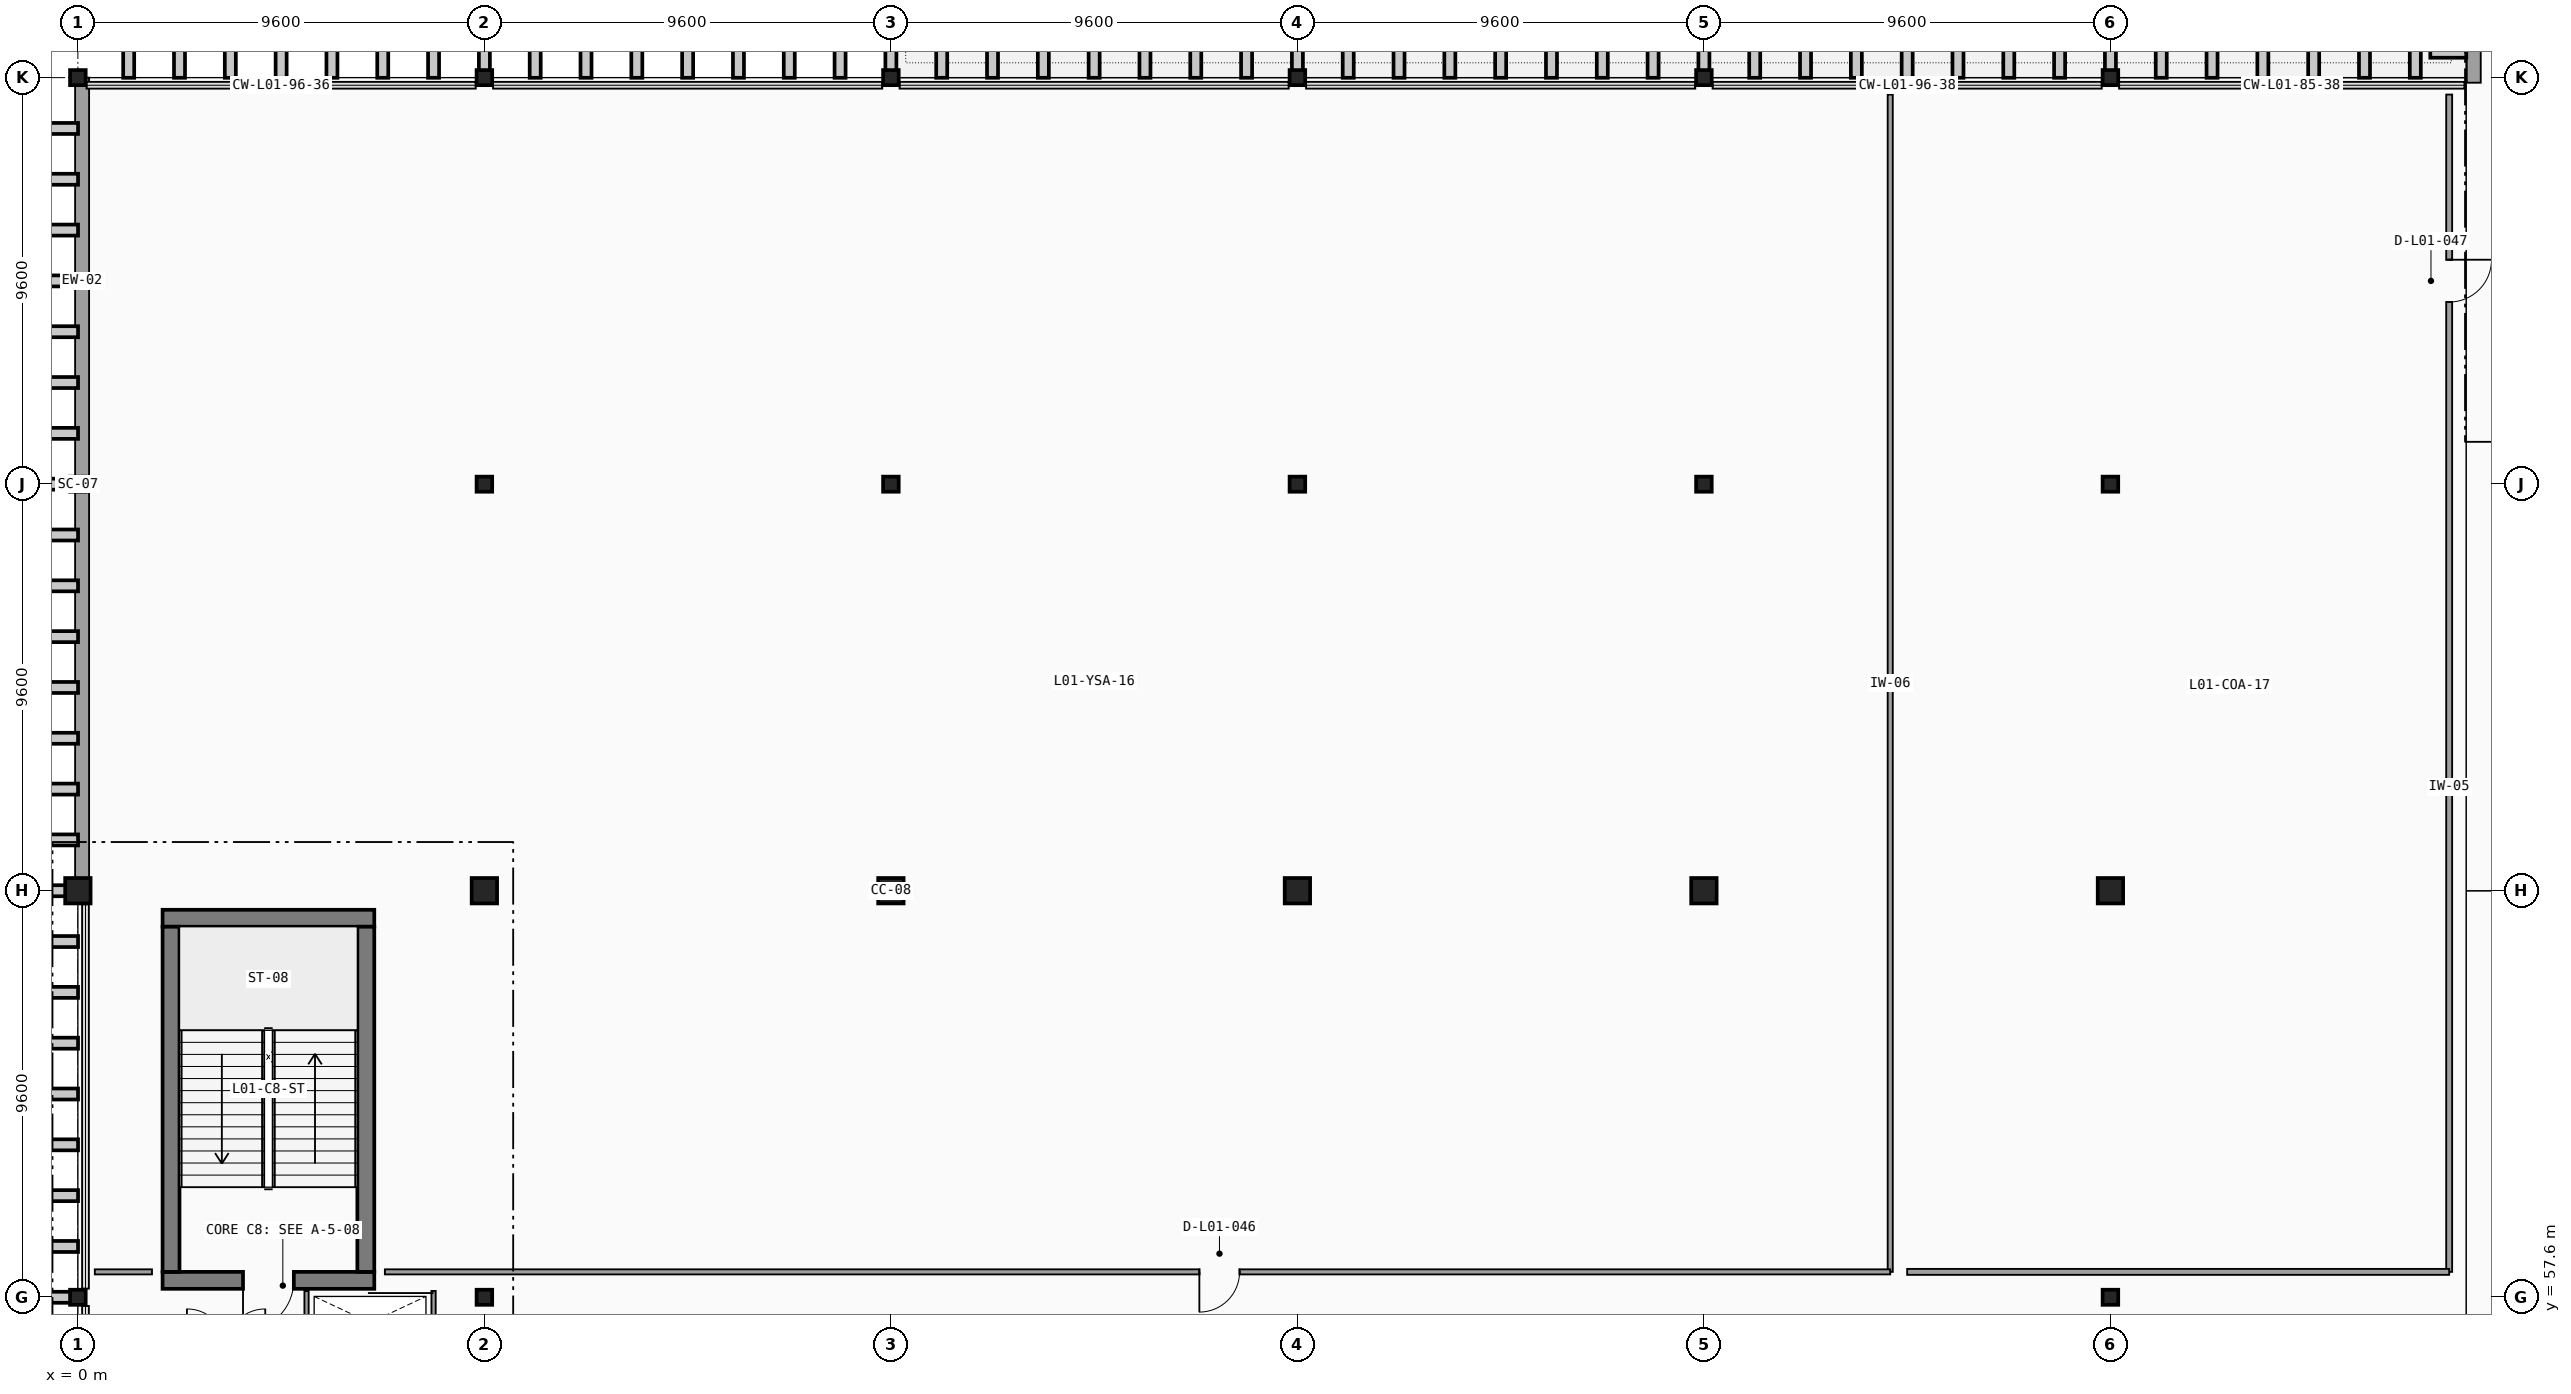
"""IFC4 building model, lengths in metres.
Left out: names, types, materials, properties, quantities, classifications, styles, units other than length and angle.
Written with IfcOpenShell. Run it as: python <this file> out.ifc"""

import sys

from ifc_helpers import new_model, si_unit, direction, frame, frame_2d, origin, origin_2d, place, context, subcontext, project, spatial, rectangle, i_section, extrude, element, fill, save


model = new_model("IFC4")
c1 = context("Model", 3, precision=1e-05, world=origin(), true_north=direction((0.0, 1.0)))
c2 = subcontext(c1, "Body", "Model", "MODEL_VIEW")
j1 = project(units=[si_unit("LENGTHUNIT", "METRE"), si_unit("PLANEANGLEUNIT", "RADIAN")], contexts=[c1])
p1 = place(None, origin())
s1 = spatial("IfcSite", under=j1, at=p1, CompositionType="ELEMENT")
p2 = place(p1, origin())
s2 = spatial("IfcBuilding", under=s1, at=p2, CompositionType="ELEMENT")
p3 = place(p2, frame((0.0, 0.0, 4.8)))
s3 = spatial("IfcBuildingStorey", under=s2, at=p3, CompositionType="ELEMENT", Elevation=4.8)
p4 = place(p3, frame((0.0, 57.6, 0.0), z_axis=(0.0, 0.0, 1.0), x_axis=(1.0, 0.0, 0.0)))
e1 = element("IfcColumn", 1, at=p4, inside=s3, PredefinedType="COLUMN", context=c2, shape_type="SweptSolid", body=[
    extrude(i_section(OverallWidth=0.369, OverallDepth=0.356, WebThickness=0.011, FlangeThickness=0.018, FilletRadius=0.015, at=origin_2d()), origin(), (0.0, 0.0, 1.0), 4.8),
])
p5 = place(p3, frame((0.0, 67.2, 0.0), z_axis=(0.0, 0.0, 1.0), x_axis=(1.0, 0.0, 0.0)))
e2 = element("IfcColumn", 2, at=p5, inside=s3, PredefinedType="COLUMN", context=c2, shape_type="SweptSolid", body=[
    extrude(rectangle(XDim=0.6, YDim=0.6, at=origin_2d()), origin(), (0.0, 0.0, 1.0), 4.8),
])
for number, where, z_axis, x_axis in (
    (3, (0.0, 76.8, 0.0), (0.0, 0.0, 1.0), (1.0, 0.0, 0.0)),
    (4, (0.0, 86.4, 0.0), (0.0, 0.0, 1.0), (1.0, 0.0, 0.0)),
    (5, (9.6, 57.6, 0.0), (0.0, 0.0, 1.0), (1.0, 0.0, 0.0)),
):
    element("IfcColumn", number, at=place(p3, frame(where, z_axis=z_axis, x_axis=x_axis)), inside=s3, PredefinedType="COLUMN", context=c2, shape_type="SweptSolid", body=[
        extrude(i_section(OverallWidth=0.369, OverallDepth=0.356, WebThickness=0.011, FlangeThickness=0.018, FilletRadius=0.015, at=origin_2d()), origin(), (0.0, 0.0, 1.0), 4.8),
    ])
p6 = place(p3, frame((9.6, 67.2, 0.0), z_axis=(0.0, 0.0, 1.0), x_axis=(1.0, 0.0, 0.0)))
e6 = element("IfcColumn", 6, at=p6, inside=s3, PredefinedType="COLUMN", context=c2, shape_type="SweptSolid", body=[
    extrude(rectangle(XDim=0.6, YDim=0.6, at=origin_2d()), origin(), (0.0, 0.0, 1.0), 4.8),
])
for number, where, z_axis, x_axis in (
    (7, (9.6, 76.8, 0.0), (0.0, 0.0, 1.0), (1.0, 0.0, 0.0)),
    (8, (9.6, 86.4, 0.0), (0.0, 0.0, 1.0), (1.0, 0.0, 0.0)),
):
    element("IfcColumn", number, at=place(p3, frame(where, z_axis=z_axis, x_axis=x_axis)), inside=s3, PredefinedType="COLUMN", context=c2, shape_type="SweptSolid", body=[
        extrude(i_section(OverallWidth=0.369, OverallDepth=0.356, WebThickness=0.011, FlangeThickness=0.018, FilletRadius=0.015, at=origin_2d()), origin(), (0.0, 0.0, 1.0), 4.8),
    ])
p7 = place(p3, frame((19.2, 67.2, 0.0), z_axis=(0.0, 0.0, 1.0), x_axis=(1.0, 0.0, 0.0)))
e9 = element("IfcColumn", 9, at=p7, inside=s3, PredefinedType="COLUMN", context=c2, shape_type="SweptSolid", body=[
    extrude(rectangle(XDim=0.6, YDim=0.6, at=origin_2d()), origin(), (0.0, 0.0, 1.0), 4.8),
])
for number, where, z_axis, x_axis in (
    (10, (19.2, 76.8, 0.0), (0.0, 0.0, 1.0), (1.0, 0.0, 0.0)),
    (11, (19.2, 86.4, 0.0), (0.0, 0.0, 1.0), (1.0, 0.0, 0.0)),
):
    element("IfcColumn", number, at=place(p3, frame(where, z_axis=z_axis, x_axis=x_axis)), inside=s3, PredefinedType="COLUMN", context=c2, shape_type="SweptSolid", body=[
        extrude(i_section(OverallWidth=0.369, OverallDepth=0.356, WebThickness=0.011, FlangeThickness=0.018, FilletRadius=0.015, at=origin_2d()), origin(), (0.0, 0.0, 1.0), 4.8),
    ])
p8 = place(p3, frame((28.8, 67.2, 0.0), z_axis=(0.0, 0.0, 1.0), x_axis=(1.0, 0.0, 0.0)))
e12 = element("IfcColumn", 12, at=p8, inside=s3, PredefinedType="COLUMN", context=c2, shape_type="SweptSolid", body=[
    extrude(rectangle(XDim=0.6, YDim=0.6, at=origin_2d()), origin(), (0.0, 0.0, 1.0), 4.8),
])
for number, where, z_axis, x_axis in (
    (13, (28.8, 76.8, 0.0), (0.0, 0.0, 1.0), (1.0, 0.0, 0.0)),
    (14, (28.8, 86.4, 0.0), (0.0, 0.0, 1.0), (1.0, 0.0, 0.0)),
):
    element("IfcColumn", number, at=place(p3, frame(where, z_axis=z_axis, x_axis=x_axis)), inside=s3, PredefinedType="COLUMN", context=c2, shape_type="SweptSolid", body=[
        extrude(i_section(OverallWidth=0.369, OverallDepth=0.356, WebThickness=0.011, FlangeThickness=0.018, FilletRadius=0.015, at=origin_2d()), origin(), (0.0, 0.0, 1.0), 4.8),
    ])
p9 = place(p3, frame((38.4, 67.2, 0.0), z_axis=(0.0, 0.0, 1.0), x_axis=(1.0, 0.0, 0.0)))
e15 = element("IfcColumn", 15, at=p9, inside=s3, PredefinedType="COLUMN", context=c2, shape_type="SweptSolid", body=[
    extrude(rectangle(XDim=0.6, YDim=0.6, at=origin_2d()), origin(), (0.0, 0.0, 1.0), 4.8),
])
for number, where, z_axis, x_axis in (
    (16, (38.4, 76.8, 0.0), (0.0, 0.0, 1.0), (1.0, 0.0, 0.0)),
    (17, (38.4, 86.4, 0.0), (0.0, 0.0, 1.0), (1.0, 0.0, 0.0)),
    (18, (48.0, 57.6, 0.0), (0.0, 0.0, 1.0), (1.0, 0.0, 0.0)),
):
    element("IfcColumn", number, at=place(p3, frame(where, z_axis=z_axis, x_axis=x_axis)), inside=s3, PredefinedType="COLUMN", context=c2, shape_type="SweptSolid", body=[
        extrude(i_section(OverallWidth=0.369, OverallDepth=0.356, WebThickness=0.011, FlangeThickness=0.018, FilletRadius=0.015, at=origin_2d()), origin(), (0.0, 0.0, 1.0), 4.8),
    ])
p10 = place(p3, frame((48.0, 67.2, 0.0), z_axis=(0.0, 0.0, 1.0), x_axis=(1.0, 0.0, 0.0)))
e19 = element("IfcColumn", 19, at=p10, inside=s3, PredefinedType="COLUMN", context=c2, shape_type="SweptSolid", body=[
    extrude(rectangle(XDim=0.6, YDim=0.6, at=origin_2d()), origin(), (0.0, 0.0, 1.0), 4.8),
])
for number, where, z_axis, x_axis in (
    (20, (48.0, 76.8, 0.0), (0.0, 0.0, 1.0), (1.0, 0.0, 0.0)),
    (21, (48.0, 86.4, 0.0), (0.0, 0.0, 1.0), (1.0, 0.0, 0.0)),
):
    element("IfcColumn", number, at=place(p3, frame(where, z_axis=z_axis, x_axis=x_axis)), inside=s3, PredefinedType="COLUMN", context=c2, shape_type="SweptSolid", body=[
        extrude(i_section(OverallWidth=0.369, OverallDepth=0.356, WebThickness=0.011, FlangeThickness=0.018, FilletRadius=0.015, at=origin_2d()), origin(), (0.0, 0.0, 1.0), 4.8),
    ])
p11 = place(p3, frame((56.58, 94.32, 0.0), z_axis=(0.0, 0.0, 1.0), x_axis=(0.0, -1.0, 0.0)))
e22 = element("IfcWall", 22, at=p11, inside=s3, PredefinedType="SOLIDWALL", context=c2, shape_type="SweptSolid", body=[
    extrude(rectangle(XDim=8.04, YDim=0.33, at=frame_2d((4.02, 0.0))), origin(), (0.0, 0.0, 1.0), 3.758),
])
p12 = place(p11, frame((3.927, 0.0, 0.0), z_axis=(0.0, 0.0, 1.0), x_axis=(-1.0, 0.0, 0.0)))
e23 = element("IfcOpeningElement", 23, at=p12, cuts=e22, PredefinedType="OPENING", context=c2, shape_type="SweptSolid", body=[
    extrude(rectangle(XDim=1.6, YDim=2.25, at=frame_2d((0.8, 1.125))), frame((0.0, 0.175, 0.0), z_axis=(0.0, -1.0, 0.0), x_axis=(1.0, 0.0, 0.0)), (0.0, 0.0, 1.0), 0.35),
])
p13 = place(p3, frame((0.1, 86.4, 0.0), z_axis=(0.0, 0.0, 1.0), x_axis=(0.0, -1.0, 0.0)))
e24 = element("IfcWall", 24, at=p13, inside=s3, PredefinedType="SOLIDWALL", context=c2, shape_type="SweptSolid", body=[
    extrude(rectangle(XDim=9.6, YDim=0.33, at=frame_2d((4.8, 0.0))), origin(), (0.0, 0.0, 1.0), 3.593),
])
p14 = place(p3, frame((0.1, 76.8, 0.0), z_axis=(0.0, 0.0, 1.0), x_axis=(0.0, -1.0, 0.0)))
e25 = element("IfcWall", 25, at=p14, inside=s3, PredefinedType="SOLIDWALL", context=c2, shape_type="SweptSolid", body=[
    extrude(rectangle(XDim=9.6, YDim=0.33, at=frame_2d((4.8, 0.0))), origin(), (0.0, 0.0, 1.0), 3.593),
])
p15 = place(p3, frame((2.0, 58.0, 0.0), z_axis=(0.0, 0.0, 1.0), x_axis=(1.0, 0.0, 0.0)))
e26 = element("IfcWall", 26, at=p15, inside=s3, PredefinedType="SHEAR", context=c2, shape_type="SweptSolid", body=[
    extrude(rectangle(XDim=5.0, YDim=0.4, at=frame_2d((2.5, 0.0))), origin(), (0.0, 0.0, 1.0), 4.52),
])
p16 = place(p15, frame((3.1, 0.0, 0.0), z_axis=(0.0, 0.0, 1.0), x_axis=(-1.0, 0.0, 0.0)))
e27 = element("IfcOpeningElement", 27, at=p16, cuts=e26, PredefinedType="OPENING", context=c2, shape_type="SweptSolid", body=[
    extrude(rectangle(XDim=1.2, YDim=2.2, at=frame_2d((0.6, 1.1))), frame((0.0, 0.21, 0.0), z_axis=(0.0, -1.0, 0.0), x_axis=(1.0, 0.0, 0.0)), (0.0, 0.0, 1.0), 0.42),
])
p17 = place(p3, frame((7.0, 66.55, 0.0), z_axis=(0.0, 0.0, 1.0), x_axis=(-1.0, 0.0, 0.0)))
e28 = element("IfcWall", 28, at=p17, inside=s3, PredefinedType="SHEAR", context=c2, shape_type="SweptSolid", body=[
    extrude(rectangle(XDim=5.0, YDim=0.4, at=frame_2d((2.5, 0.0))), origin(), (0.0, 0.0, 1.0), 4.52),
])
for number, where, z_axis, x_axis in (
    (29, (2.2, 66.35, 0.0), (0.0, 0.0, 1.0), (0.0, -1.0, 0.0)),
    (30, (6.8, 58.2, 0.0), (0.0, 0.0, 1.0), (0.0, 1.0, 0.0)),
):
    element("IfcWall", number, at=place(p3, frame(where, z_axis=z_axis, x_axis=x_axis)), inside=s3, PredefinedType="SHEAR", context=c2, shape_type="SweptSolid", body=[
        extrude(rectangle(XDim=8.15, YDim=0.4, at=frame_2d((4.075, 0.0))), origin(), (0.0, 0.0, 1.0), 4.52),
    ])
for number, where, z_axis, x_axis in (
    (31, (5.4, 57.75, 0.0), (0.0, 0.0, 1.0), (0.0, -1.0, 0.0)),
    (32, (8.4, 56.25, 0.0), (0.0, 0.0, 1.0), (0.0, 1.0, 0.0)),
):
    element("IfcWall", number, at=place(p3, frame(where, z_axis=z_axis, x_axis=x_axis)), inside=s3, PredefinedType="PARTITIONING", context=c2, shape_type="SweptSolid", body=[
        extrude(rectangle(XDim=1.5, YDim=0.1, at=frame_2d((0.75, 0.0))), origin(), (0.0, 0.0, 1.0), 4.52),
    ])
p18 = place(p3, frame((1.75, 58.2, 0.0), z_axis=(0.0, 0.0, 1.0), x_axis=(-1.0, 0.0, 0.0)))
e33 = element("IfcWall", 33, at=p18, inside=s3, PredefinedType="PARTITIONING", context=c2, shape_type="SweptSolid", body=[
    extrude(rectangle(XDim=1.35, YDim=0.12, at=frame_2d((0.675, 0.0))), origin(), (0.0, 0.0, 1.0), 4.52),
])
p19 = place(p3, frame((42.8, 86.0, 0.0), z_axis=(0.0, 0.0, 1.0), x_axis=(0.0, -1.0, 0.0)))
e34 = element("IfcWall", 34, at=p19, inside=s3, PredefinedType="PARTITIONING", context=c2, shape_type="SweptSolid", body=[
    extrude(rectangle(XDim=27.8, YDim=0.12, at=frame_2d((13.9, 0.0))), origin(), (0.0, 0.0, 1.0), 3.758),
])
p20 = place(p3, frame((42.8, 58.2, 0.0), z_axis=(0.0, 0.0, 1.0), x_axis=(-1.0, 0.0, 0.0)))
e35 = element("IfcWall", 35, at=p20, inside=s3, PredefinedType="PARTITIONING", context=c2, shape_type="SweptSolid", body=[
    extrude(rectangle(XDim=35.55, YDim=0.12, at=frame_2d((17.775, 0.0))), origin(), (0.0, 0.0, 1.0), 2.52),
])
p21 = place(p20, frame((15.365, 0.0, 0.0), z_axis=(0.0, 0.0, 1.0), x_axis=(1.0, 0.0, 0.0)))
e36 = element("IfcOpeningElement", 36, at=p21, cuts=e35, PredefinedType="OPENING", context=c2, shape_type="SweptSolid", body=[
    extrude(rectangle(XDim=0.95, YDim=2.15, at=frame_2d((0.475, 1.075))), frame((0.0, 0.07, 0.0), z_axis=(0.0, -1.0, 0.0), x_axis=(1.0, 0.0, 0.0)), (0.0, 0.0, 1.0), 0.14),
])
p22 = place(p3, frame((56.0, 86.0, 0.0), z_axis=(0.0, 0.0, 1.0), x_axis=(0.0, -1.0, 0.0)))
e37 = element("IfcWall", 37, at=p22, inside=s3, PredefinedType="PARTITIONING", context=c2, shape_type="SweptSolid", body=[
    extrude(rectangle(XDim=27.8, YDim=0.14, at=frame_2d((13.9, 0.0))), origin(), (0.0, 0.0, 1.0), 3.758),
])
p23 = place(p22, frame((3.9, 0.0, 0.0), z_axis=(0.0, 0.0, 1.0), x_axis=(1.0, 0.0, 0.0)))
e38 = element("IfcOpeningElement", 38, at=p23, cuts=e37, PredefinedType="OPENING", context=c2, shape_type="SweptSolid", body=[
    extrude(rectangle(XDim=1.0, YDim=2.2, at=frame_2d((0.5, 1.1))), frame((0.0, 0.08, 0.0), z_axis=(0.0, -1.0, 0.0), x_axis=(1.0, 0.0, 0.0)), (0.0, 0.0, 1.0), 0.16),
])
p24 = place(p3, frame((56.0, 58.2, 0.0), z_axis=(0.0, 0.0, 1.0), x_axis=(-1.0, 0.0, 0.0)))
e39 = element("IfcWall", 39, at=p24, inside=s3, PredefinedType="PARTITIONING", context=c2, shape_type="SweptSolid", body=[
    extrude(rectangle(XDim=12.8, YDim=0.14, at=frame_2d((6.4, 0.0))), origin(), (0.0, 0.0, 1.0), 3.913),
])
p25 = place(p16, origin())
e40 = element("IfcDoor", 40, at=p25, inside=s3, OperationType="SINGLE_SWING_RIGHT", PredefinedType="DOOR", context=c2, shape_type="SweptSolid", body=[
    extrude(rectangle(XDim=1.2, YDim=2.2, at=frame_2d((0.6, 1.1))), frame((0.0, 0.025, 0.0), z_axis=(0.0, -1.0, 0.0), x_axis=(1.0, 0.0, 0.0)), (0.0, 0.0, 1.0), 0.05),
])
fill(e27, e40)
p26 = place(p21, origin())
e41 = element("IfcDoor", 41, at=p26, inside=s3, OperationType="SINGLE_SWING_RIGHT", PredefinedType="DOOR", context=c2, shape_type="SweptSolid", body=[
    extrude(rectangle(XDim=0.95, YDim=2.15, at=frame_2d((0.475, 1.075))), frame((0.0, 0.025, 0.0), z_axis=(0.0, -1.0, 0.0), x_axis=(1.0, 0.0, 0.0)), (0.0, 0.0, 1.0), 0.05),
])
fill(e36, e41)
p27 = place(p23, origin())
e42 = element("IfcDoor", 42, at=p27, inside=s3, OperationType="SINGLE_SWING_LEFT", PredefinedType="DOOR", context=c2, shape_type="SweptSolid", body=[
    extrude(rectangle(XDim=1.0, YDim=2.2, at=frame_2d((0.5, 1.1))), frame((0.0, 0.025, 0.0), z_axis=(0.0, -1.0, 0.0), x_axis=(1.0, 0.0, 0.0)), (0.0, 0.0, 1.0), 0.05),
])
fill(e38, e42)
save(model, sys.argv[1])
